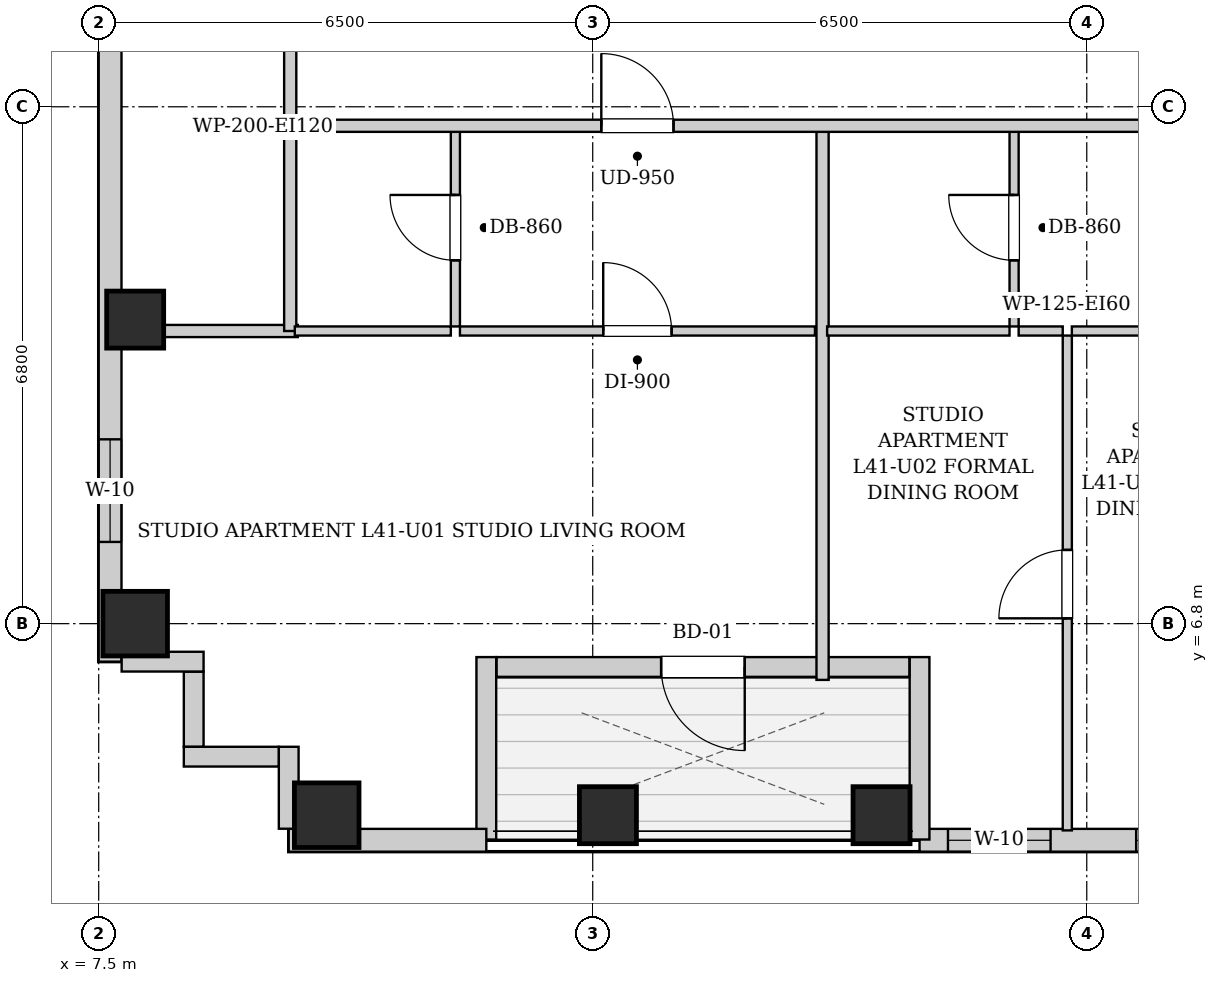
"""IFC4 building model, lengths in metres.
Left out: names, types, materials, properties, quantities, classifications, styles, units other than length and angle.
Written with IfcOpenShell. Run it as: python <this file> out.ifc"""

import sys

from ifc_helpers import new_model, si_unit, direction, frame, frame_2d, origin, origin_2d, place, context, subcontext, project, spatial, rectangle, extrude, element, fill, save


model = new_model("IFC4")
c1 = context("Model", 3, precision=1e-05, world=origin(), true_north=direction((0.0, 1.0)))
c2 = subcontext(c1, "Body", "Model", "MODEL_VIEW")
j1 = project(units=[si_unit("LENGTHUNIT", "METRE"), si_unit("PLANEANGLEUNIT", "RADIAN")], contexts=[c1])
p1 = place(None, origin())
s1 = spatial("IfcSite", under=j1, at=p1, CompositionType="ELEMENT")
p2 = place(p1, origin())
s2 = spatial("IfcBuilding", under=s1, at=p2, CompositionType="ELEMENT")
p3 = place(p2, frame((0.0, 0.0, 143.9)))
s3 = spatial("IfcBuildingStorey", under=s2, at=p3, CompositionType="ELEMENT", Elevation=143.9)
p4 = place(p3, frame((10.5, 4.28, 0.0), z_axis=(0.0, 0.0, 1.0), x_axis=(1.0, 0.0, 0.0)))
e1 = element("IfcColumn", 1, at=p4, inside=s3, PredefinedType="COLUMN", context=c2, shape_type="SweptSolid", body=[
    extrude(rectangle(XDim=0.85, YDim=0.85, at=origin_2d()), origin(), (0.0, 0.0, 1.0), 3.25),
])
for number, where, z_axis, x_axis in (
    (2, (14.2, 4.28, 0.0), (0.0, 0.0, 1.0), (1.0, 0.0, 0.0)),
    (3, (17.8, 4.28, 0.0), (0.0, 0.0, 1.0), (1.0, 0.0, 0.0)),
):
    element("IfcColumn", number, at=place(p3, frame(where, z_axis=z_axis, x_axis=x_axis)), inside=s3, PredefinedType="COLUMN", context=c2, shape_type="SweptSolid", body=[
        extrude(rectangle(XDim=0.75, YDim=0.75, at=origin_2d()), origin(), (0.0, 0.0, 1.0), 3.25),
    ])
p5 = place(p3, frame((7.98, 6.8, 0.0), z_axis=(0.0, 0.0, 1.0), x_axis=(1.0, 0.0, 0.0)))
e4 = element("IfcColumn", 4, at=p5, inside=s3, PredefinedType="COLUMN", context=c2, shape_type="SweptSolid", body=[
    extrude(rectangle(XDim=0.85, YDim=0.85, at=origin_2d()), origin(), (0.0, 0.0, 1.0), 3.25),
])
p6 = place(p3, frame((7.98, 10.8, 0.0), z_axis=(0.0, 0.0, 1.0), x_axis=(1.0, 0.0, 0.0)))
e5 = element("IfcColumn", 5, at=p6, inside=s3, PredefinedType="COLUMN", context=c2, shape_type="SweptSolid", body=[
    extrude(rectangle(XDim=0.75, YDim=0.75, at=origin_2d()), origin(), (0.0, 0.0, 1.0), 3.25),
])
p7 = place(p3, frame((31.5, 3.95, 0.0), z_axis=(0.0, 0.0, 1.0), x_axis=(-1.0, 0.0, 0.0)))
e6 = element("IfcWall", 6, at=p7, inside=s3, PredefinedType="SOLIDWALL", context=c2, shape_type="SweptSolid", body=[
    extrude(rectangle(XDim=13.2, YDim=0.3, at=frame_2d((6.6, 0.0))), origin(), (0.0, 0.0, 1.0), 2.99),
])
p8 = place(p7, frame((11.476, 0.0, 0.55)))
e7 = element("IfcOpeningElement", 7, at=p8, cuts=e6, PredefinedType="OPENING", context=c2, shape_type="SweptSolid", body=[
    extrude(rectangle(XDim=1.35, YDim=1.2, at=frame_2d((0.675, 0.6))), frame((0.0, 0.16, 0.0), z_axis=(0.0, -1.0, 0.0), x_axis=(1.0, 0.0, 0.0)), (0.0, 0.0, 1.0), 0.32),
])
p9 = place(p7, frame((9.0, 0.0, 0.55)))
e8 = element("IfcOpeningElement", 8, at=p9, cuts=e6, PredefinedType="OPENING", context=c2, shape_type="SweptSolid", body=[
    extrude(rectangle(XDim=1.35, YDim=1.2, at=frame_2d((0.675, 0.6))), frame((0.0, 0.16, 0.0), z_axis=(0.0, -1.0, 0.0), x_axis=(1.0, 0.0, 0.0)), (0.0, 0.0, 1.0), 0.32),
])
p10 = place(p7, frame((2.55, 0.0, 0.55)))
e9 = element("IfcOpeningElement", 9, at=p10, cuts=e6, PredefinedType="OPENING", context=c2, shape_type="SweptSolid", body=[
    extrude(rectangle(XDim=1.35, YDim=1.2, at=frame_2d((0.675, 0.6))), frame((0.0, 0.16, 0.0), z_axis=(0.0, -1.0, 0.0), x_axis=(1.0, 0.0, 0.0)), (0.0, 0.0, 1.0), 0.32),
])
p11 = place(p7, frame((0.475, 0.0, 0.55)))
e10 = element("IfcOpeningElement", 10, at=p11, cuts=e6, PredefinedType="OPENING", context=c2, shape_type="SweptSolid", body=[
    extrude(rectangle(XDim=0.85, YDim=1.2, at=frame_2d((0.425, 0.6))), frame((0.0, 0.16, 0.0), z_axis=(0.0, -1.0, 0.0), x_axis=(1.0, 0.0, 0.0)), (0.0, 0.0, 1.0), 0.32),
])
p12 = place(p3, frame((18.3, 3.96, 0.0), z_axis=(0.0, 0.0, 1.0), x_axis=(0.0, 1.0, 0.0)))
e11 = element("IfcWall", 11, at=p12, inside=s3, PredefinedType="SOLIDWALL", context=c2, shape_type="SweptSolid", body=[
    extrude(rectangle(XDim=2.4, YDim=0.26, at=frame_2d((1.2, 0.0))), origin(), (0.0, 0.0, 1.0), 2.99),
])
p13 = place(p3, frame((18.166, 6.23, 0.0), z_axis=(0.0, 0.0, 1.0), x_axis=(-1.0, 0.0, 0.0)))
e12 = element("IfcWall", 12, at=p13, inside=s3, PredefinedType="SOLIDWALL", context=c2, shape_type="SweptSolid", body=[
    extrude(rectangle(XDim=5.432, YDim=0.26, at=frame_2d((2.716, 0.0))), origin(), (0.0, 0.0, 1.0), 2.99),
])
p14 = place(p13, frame((2.166, 0.0, 0.0)))
e13 = element("IfcOpeningElement", 13, at=p14, cuts=e12, PredefinedType="OPENING", context=c2, shape_type="SweptSolid", body=[
    extrude(rectangle(XDim=1.1, YDim=2.0, at=frame_2d((0.55, 1.0))), frame((0.0, 0.14, 0.0), z_axis=(0.0, -1.0, 0.0), x_axis=(1.0, 0.0, 0.0)), (0.0, 0.0, 1.0), 0.28),
])
p15 = place(p3, frame((12.6, 6.36, 0.0), z_axis=(0.0, 0.0, 1.0), x_axis=(0.0, -1.0, 0.0)))
e14 = element("IfcWall", 14, at=p15, inside=s3, PredefinedType="SOLIDWALL", context=c2, shape_type="SweptSolid", body=[
    extrude(rectangle(XDim=2.4, YDim=0.26, at=frame_2d((1.2, 0.0))), origin(), (0.0, 0.0, 1.0), 2.99),
])
p16 = place(p3, frame((12.6, 3.95, 0.0), z_axis=(0.0, 0.0, 1.0), x_axis=(-1.0, 0.0, 0.0)))
e15 = element("IfcWall", 15, at=p16, inside=s3, PredefinedType="SOLIDWALL", context=c2, shape_type="SweptSolid", body=[
    extrude(rectangle(XDim=2.6, YDim=0.3, at=frame_2d((1.3, 0.0))), origin(), (0.0, 0.0, 1.0), 2.99),
])
p17 = place(p3, frame((7.65, 6.3, 0.0), z_axis=(0.0, 0.0, 1.0), x_axis=(0.0, 1.0, 0.0)))
e16 = element("IfcWall", 16, at=p17, inside=s3, PredefinedType="SOLIDWALL", context=c2, shape_type="SweptSolid", body=[
    extrude(rectangle(XDim=34.5, YDim=0.3, at=frame_2d((17.25, 0.0))), origin(), (0.0, 0.0, 1.0), 2.99),
])
p18 = place(p17, frame((1.575, 0.0, 0.55)))
e17 = element("IfcOpeningElement", 17, at=p18, cuts=e16, PredefinedType="OPENING", context=c2, shape_type="SweptSolid", body=[
    extrude(rectangle(XDim=1.35, YDim=1.2, at=frame_2d((0.675, 0.6))), frame((0.0, 0.16, 0.0), z_axis=(0.0, -1.0, 0.0), x_axis=(1.0, 0.0, 0.0)), (0.0, 0.0, 1.0), 0.32),
])
p19 = place(p17, frame((30.075, 0.0, 0.55)))
e18 = element("IfcOpeningElement", 18, at=p19, cuts=e16, PredefinedType="OPENING", context=c2, shape_type="SweptSolid", body=[
    extrude(rectangle(XDim=1.35, YDim=1.2, at=frame_2d((0.675, 0.6))), frame((0.0, 0.16, 0.0), z_axis=(0.0, -1.0, 0.0), x_axis=(1.0, 0.0, 0.0)), (0.0, 0.0, 1.0), 0.32),
])
p20 = place(p17, frame((28.235, 0.0, 0.55)))
e19 = element("IfcOpeningElement", 19, at=p20, cuts=e16, PredefinedType="OPENING", context=c2, shape_type="SweptSolid", body=[
    extrude(rectangle(XDim=1.35, YDim=1.2, at=frame_2d((0.675, 0.6))), frame((0.0, 0.16, 0.0), z_axis=(0.0, -1.0, 0.0), x_axis=(1.0, 0.0, 0.0)), (0.0, 0.0, 1.0), 0.32),
])
p21 = place(p17, frame((11.175, 0.0, 0.55)))
e20 = element("IfcOpeningElement", 20, at=p21, cuts=e16, PredefinedType="OPENING", context=c2, shape_type="SweptSolid", body=[
    extrude(rectangle(XDim=1.35, YDim=1.2, at=frame_2d((0.675, 0.6))), frame((0.0, 0.16, 0.0), z_axis=(0.0, -1.0, 0.0), x_axis=(1.0, 0.0, 0.0)), (0.0, 0.0, 1.0), 0.32),
])
p22 = place(p17, frame((9.235, 0.0, 0.55)))
e21 = element("IfcOpeningElement", 21, at=p22, cuts=e16, PredefinedType="OPENING", context=c2, shape_type="SweptSolid", body=[
    extrude(rectangle(XDim=1.35, YDim=1.2, at=frame_2d((0.675, 0.6))), frame((0.0, 0.16, 0.0), z_axis=(0.0, -1.0, 0.0), x_axis=(1.0, 0.0, 0.0)), (0.0, 0.0, 1.0), 0.32),
])
p23 = place(p17, frame((18.2, 0.0, 0.55)))
e22 = element("IfcOpeningElement", 22, at=p23, cuts=e16, PredefinedType="OPENING", context=c2, shape_type="SweptSolid", body=[
    extrude(rectangle(XDim=1.35, YDim=1.2, at=frame_2d((0.675, 0.6))), frame((0.0, 0.16, 0.0), z_axis=(0.0, -1.0, 0.0), x_axis=(1.0, 0.0, 0.0)), (0.0, 0.0, 1.0), 0.32),
])
p24 = place(p17, frame((19.81, 0.0, 0.55)))
e23 = element("IfcOpeningElement", 23, at=p24, cuts=e16, PredefinedType="OPENING", context=c2, shape_type="SweptSolid", body=[
    extrude(rectangle(XDim=1.35, YDim=1.2, at=frame_2d((0.675, 0.6))), frame((0.0, 0.16, 0.0), z_axis=(0.0, -1.0, 0.0), x_axis=(1.0, 0.0, 0.0)), (0.0, 0.0, 1.0), 0.32),
])
p25 = place(p3, frame((10.0, 4.102, 0.0), z_axis=(0.0, 0.0, 1.0), x_axis=(0.0, 1.0, 0.0)))
e24 = element("IfcWall", 24, at=p25, inside=s3, PredefinedType="SOLIDWALL", context=c2, shape_type="SweptSolid", body=[
    extrude(rectangle(XDim=1.078, YDim=0.26, at=frame_2d((0.539, 0.0))), origin(), (0.0, 0.0, 1.0), 2.99),
])
p26 = place(p3, frame((9.868, 5.05, 0.0), z_axis=(0.0, 0.0, 1.0), x_axis=(-1.0, 0.0, 0.0)))
e25 = element("IfcWall", 25, at=p26, inside=s3, PredefinedType="SOLIDWALL", context=c2, shape_type="SweptSolid", body=[
    extrude(rectangle(XDim=1.248, YDim=0.26, at=frame_2d((0.624, 0.0))), origin(), (0.0, 0.0, 1.0), 2.99),
])
p27 = place(p3, frame((8.75, 5.182, 0.0), z_axis=(0.0, 0.0, 1.0), x_axis=(0.0, 1.0, 0.0)))
e26 = element("IfcWall", 26, at=p27, inside=s3, PredefinedType="SOLIDWALL", context=c2, shape_type="SweptSolid", body=[
    extrude(rectangle(XDim=0.986, YDim=0.26, at=frame_2d((0.493, 0.0))), origin(), (0.0, 0.0, 1.0), 2.99),
])
p28 = place(p3, frame((8.88, 6.3, 0.0), z_axis=(0.0, 0.0, 1.0), x_axis=(-1.0, 0.0, 0.0)))
e27 = element("IfcWall", 27, at=p28, inside=s3, PredefinedType="SOLIDWALL", context=c2, shape_type="SweptSolid", body=[
    extrude(rectangle(XDim=1.078, YDim=0.26, at=frame_2d((0.539, 0.0))), origin(), (0.0, 0.0, 1.0), 2.99),
])
p29 = place(p3, frame((10.02, 13.35, 0.0), z_axis=(0.0, 0.0, 1.0), x_axis=(0.0, 1.0, 0.0)))
e28 = element("IfcWall", 28, at=p29, inside=s3, PredefinedType="PARTITIONING", context=c2, shape_type="SweptSolid", body=[
    extrude(rectangle(XDim=1.74, YDim=0.16, at=frame_2d((0.87, 0.0))), origin(), (0.0, 0.0, 1.0), 2.99),
])
p30 = place(p3, frame((7.78, 10.65, 0.0), z_axis=(0.0, 0.0, 1.0), x_axis=(1.0, 0.0, 0.0)))
e29 = element("IfcWall", 29, at=p30, inside=s3, PredefinedType="PARTITIONING", context=c2, shape_type="SweptSolid", body=[
    extrude(rectangle(XDim=2.34, YDim=0.16, at=frame_2d((1.17, 0.0))), origin(), (0.0, 0.0, 1.0), 2.99),
])
p31 = place(p3, frame((10.02, 10.65, 0.0), z_axis=(0.0, 0.0, 1.0), x_axis=(0.0, 1.0, 0.0)))
e30 = element("IfcWall", 30, at=p31, inside=s3, PredefinedType="PARTITIONING", context=c2, shape_type="SweptSolid", body=[
    extrude(rectangle(XDim=2.66, YDim=0.16, at=frame_2d((1.33, 0.0))), origin(), (0.0, 0.0, 1.0), 2.99),
])
p32 = place(p3, frame((12.193, 10.71, 0.0), z_axis=(0.0, 0.0, 1.0), x_axis=(0.0, 1.0, 0.0)))
e31 = element("IfcWall", 31, at=p32, inside=s3, PredefinedType="PARTITIONING", context=c2, shape_type="SweptSolid", body=[
    extrude(rectangle(XDim=2.6, YDim=0.12, at=frame_2d((1.3, 0.0))), origin(), (0.0, 0.0, 1.0), 2.99),
])
p33 = place(p32, frame((0.87, 0.0, 0.0)))
e32 = element("IfcOpeningElement", 32, at=p33, cuts=e31, PredefinedType="OPENING", context=c2, shape_type="SweptSolid", body=[
    extrude(rectangle(XDim=0.86, YDim=2.05, at=frame_2d((0.43, 1.025))), frame((0.0, 0.07, 0.0), z_axis=(0.0, -1.0, 0.0), x_axis=(1.0, 0.0, 0.0)), (0.0, 0.0, 1.0), 0.14),
])
p34 = place(p3, frame((10.08, 10.65, 0.0), z_axis=(0.0, 0.0, 1.0), x_axis=(1.0, 0.0, 0.0)))
e33 = element("IfcWall", 33, at=p34, inside=s3, PredefinedType="PARTITIONING", context=c2, shape_type="SweptSolid", body=[
    extrude(rectangle(XDim=2.053, YDim=0.12, at=frame_2d((1.026, 0.0))), origin(), (0.0, 0.0, 1.0), 2.99),
])
p35 = place(p3, frame((12.253, 10.65, 0.0), z_axis=(0.0, 0.0, 1.0), x_axis=(1.0, 0.0, 0.0)))
e34 = element("IfcWall", 34, at=p35, inside=s3, PredefinedType="PARTITIONING", context=c2, shape_type="SweptSolid", body=[
    extrude(rectangle(XDim=4.671, YDim=0.12, at=frame_2d((2.335, 0.0))), origin(), (0.0, 0.0, 1.0), 2.99),
])
p36 = place(p35, frame((1.885, 0.0, 0.0)))
e35 = element("IfcOpeningElement", 35, at=p36, cuts=e34, PredefinedType="OPENING", context=c2, shape_type="SweptSolid", body=[
    extrude(rectangle(XDim=0.9, YDim=2.05, at=frame_2d((0.45, 1.025))), frame((0.0, 0.07, 0.0), z_axis=(0.0, -1.0, 0.0), x_axis=(1.0, 0.0, 0.0)), (0.0, 0.0, 1.0), 0.14),
])
p37 = place(p3, frame((17.024, 6.06, 0.0), z_axis=(0.0, 0.0, 1.0), x_axis=(0.0, 1.0, 0.0)))
e36 = element("IfcWall", 36, at=p37, inside=s3, PredefinedType="PARTITIONING", context=c2, shape_type="SweptSolid", body=[
    extrude(rectangle(XDim=7.25, YDim=0.16, at=frame_2d((3.625, 0.0))), origin(), (0.0, 0.0, 1.0), 2.99),
])
p38 = place(p3, frame((19.544, 10.71, 0.0), z_axis=(0.0, 0.0, 1.0), x_axis=(0.0, 1.0, 0.0)))
e37 = element("IfcWall", 37, at=p38, inside=s3, PredefinedType="PARTITIONING", context=c2, shape_type="SweptSolid", body=[
    extrude(rectangle(XDim=2.6, YDim=0.12, at=frame_2d((1.3, 0.0))), origin(), (0.0, 0.0, 1.0), 2.99),
])
p39 = place(p38, frame((0.87, 0.0, 0.0)))
e38 = element("IfcOpeningElement", 38, at=p39, cuts=e37, PredefinedType="OPENING", context=c2, shape_type="SweptSolid", body=[
    extrude(rectangle(XDim=0.86, YDim=2.05, at=frame_2d((0.43, 1.025))), frame((0.0, 0.07, 0.0), z_axis=(0.0, -1.0, 0.0), x_axis=(1.0, 0.0, 0.0)), (0.0, 0.0, 1.0), 0.14),
])
p40 = place(p3, frame((17.084, 10.65, 0.0), z_axis=(0.0, 0.0, 1.0), x_axis=(1.0, 0.0, 0.0)))
e39 = element("IfcWall", 39, at=p40, inside=s3, PredefinedType="PARTITIONING", context=c2, shape_type="SweptSolid", body=[
    extrude(rectangle(XDim=2.4, YDim=0.12, at=frame_2d((1.2, 0.0))), origin(), (0.0, 0.0, 1.0), 2.99),
])
p41 = place(p3, frame((19.604, 10.65, 0.0), z_axis=(0.0, 0.0, 1.0), x_axis=(1.0, 0.0, 0.0)))
e40 = element("IfcWall", 40, at=p41, inside=s3, PredefinedType="PARTITIONING", context=c2, shape_type="SweptSolid", body=[
    extrude(rectangle(XDim=0.58, YDim=0.12, at=frame_2d((0.29, 0.0))), origin(), (0.0, 0.0, 1.0), 2.99),
])
p42 = place(p3, frame((20.304, 10.65, 0.0), z_axis=(0.0, 0.0, 1.0), x_axis=(1.0, 0.0, 0.0)))
e41 = element("IfcWall", 41, at=p42, inside=s3, PredefinedType="PARTITIONING", context=c2, shape_type="SweptSolid", body=[
    extrude(rectangle(XDim=3.1, YDim=0.12, at=frame_2d((1.55, 0.0))), origin(), (0.0, 0.0, 1.0), 2.99),
])
p43 = place(p42, frame((1.1, 0.0, 0.0)))
e42 = element("IfcOpeningElement", 42, at=p43, cuts=e41, PredefinedType="OPENING", context=c2, shape_type="SweptSolid", body=[
    extrude(rectangle(XDim=0.9, YDim=2.05, at=frame_2d((0.45, 1.025))), frame((0.0, 0.07, 0.0), z_axis=(0.0, -1.0, 0.0), x_axis=(1.0, 0.0, 0.0)), (0.0, 0.0, 1.0), 0.14),
])
p44 = place(p3, frame((20.244, 4.08, 0.0), z_axis=(0.0, 0.0, 1.0), x_axis=(0.0, 1.0, 0.0)))
e43 = element("IfcWall", 43, at=p44, inside=s3, PredefinedType="PARTITIONING", context=c2, shape_type="SweptSolid", body=[
    extrude(rectangle(XDim=6.51, YDim=0.12, at=frame_2d((3.255, 0.0))), origin(), (0.0, 0.0, 1.0), 2.99),
])
p45 = place(p44, frame((2.79, 0.0, 0.0)))
e44 = element("IfcOpeningElement", 44, at=p45, cuts=e43, PredefinedType="OPENING", context=c2, shape_type="SweptSolid", body=[
    extrude(rectangle(XDim=0.9, YDim=2.05, at=frame_2d((0.45, 1.025))), frame((0.0, 0.07, 0.0), z_axis=(0.0, -1.0, 0.0), x_axis=(1.0, 0.0, 0.0)), (0.0, 0.0, 1.0), 0.14),
])
p46 = place(p3, frame((10.05, 13.35, 0.0), z_axis=(0.0, 0.0, 1.0), x_axis=(1.0, 0.0, 0.0)))
e45 = element("IfcWall", 45, at=p46, inside=s3, PredefinedType="PARTITIONING", context=c2, shape_type="SweptSolid", body=[
    extrude(rectangle(XDim=27.7, YDim=0.16, at=frame_2d((13.85, 0.0))), origin(), (0.0, 0.0, 1.0), 2.99),
])
p47 = place(p46, frame((4.063, 0.0, 0.0)))
e46 = element("IfcOpeningElement", 46, at=p47, cuts=e45, PredefinedType="OPENING", context=c2, shape_type="SweptSolid", body=[
    extrude(rectangle(XDim=0.95, YDim=2.1, at=frame_2d((0.475, 1.05))), frame((0.0, 0.09, 0.0), z_axis=(0.0, -1.0, 0.0), x_axis=(1.0, 0.0, 0.0)), (0.0, 0.0, 1.0), 0.18),
])
p48 = place(p46, frame((11.735, 0.0, 0.0)))
e47 = element("IfcOpeningElement", 47, at=p48, cuts=e45, PredefinedType="OPENING", context=c2, shape_type="SweptSolid", body=[
    extrude(rectangle(XDim=0.95, YDim=2.1, at=frame_2d((0.475, 1.05))), frame((0.0, 0.09, 0.0), z_axis=(0.0, -1.0, 0.0), x_axis=(1.0, 0.0, 0.0)), (0.0, 0.0, 1.0), 0.18),
])
p49 = place(p33, origin())
e48 = element("IfcDoor", 48, at=p49, inside=s3, OperationType="SINGLE_SWING_RIGHT", PredefinedType="DOOR", context=c2, shape_type="SweptSolid", body=[
    extrude(rectangle(XDim=0.86, YDim=2.05, at=frame_2d((0.43, 1.025))), frame((0.0, 0.025, 0.0), z_axis=(0.0, -1.0, 0.0), x_axis=(1.0, 0.0, 0.0)), (0.0, 0.0, 1.0), 0.05),
])
fill(e32, e48)
p50 = place(p36, origin())
e49 = element("IfcDoor", 49, at=p50, inside=s3, OperationType="SINGLE_SWING_LEFT", PredefinedType="DOOR", context=c2, shape_type="SweptSolid", body=[
    extrude(rectangle(XDim=0.9, YDim=2.05, at=frame_2d((0.45, 1.025))), frame((0.0, 0.025, 0.0), z_axis=(0.0, -1.0, 0.0), x_axis=(1.0, 0.0, 0.0)), (0.0, 0.0, 1.0), 0.05),
])
fill(e35, e49)
p51 = place(p39, origin())
e50 = element("IfcDoor", 50, at=p51, inside=s3, OperationType="SINGLE_SWING_RIGHT", PredefinedType="DOOR", context=c2, shape_type="SweptSolid", body=[
    extrude(rectangle(XDim=0.86, YDim=2.05, at=frame_2d((0.43, 1.025))), frame((0.0, 0.025, 0.0), z_axis=(0.0, -1.0, 0.0), x_axis=(1.0, 0.0, 0.0)), (0.0, 0.0, 1.0), 0.05),
])
fill(e38, e50)
p52 = place(p45, origin())
e51 = element("IfcDoor", 51, at=p52, inside=s3, OperationType="SINGLE_SWING_LEFT", PredefinedType="DOOR", context=c2, shape_type="SweptSolid", body=[
    extrude(rectangle(XDim=0.9, YDim=2.05, at=frame_2d((0.45, 1.025))), frame((0.0, 0.025, 0.0), z_axis=(0.0, -1.0, 0.0), x_axis=(1.0, 0.0, 0.0)), (0.0, 0.0, 1.0), 0.05),
])
fill(e44, e51)
p53 = place(p47, origin())
e52 = element("IfcDoor", 52, at=p53, inside=s3, OperationType="SINGLE_SWING_LEFT", PredefinedType="DOOR", context=c2, shape_type="SweptSolid", body=[
    extrude(rectangle(XDim=0.95, YDim=2.1, at=frame_2d((0.475, 1.05))), frame((0.0, 0.025, 0.0), z_axis=(0.0, -1.0, 0.0), x_axis=(1.0, 0.0, 0.0)), (0.0, 0.0, 1.0), 0.05),
])
fill(e46, e52)
p54 = place(p14, origin())
e53 = element("IfcDoor", 53, at=p54, inside=s3, OperationType="SINGLE_SWING_LEFT", PredefinedType="DOOR", context=c2, shape_type="SweptSolid", body=[
    extrude(rectangle(XDim=1.1, YDim=2.0, at=frame_2d((0.55, 1.0))), frame((0.0, 0.025, 0.0), z_axis=(0.0, -1.0, 0.0), x_axis=(1.0, 0.0, 0.0)), (0.0, 0.0, 1.0), 0.05),
])
fill(e13, e53)
p55 = place(p18, origin())
e54 = element("IfcWindow", 54, at=p55, inside=s3, PartitioningType="SINGLE_PANEL", PredefinedType="WINDOW", context=c2, shape_type="SweptSolid", body=[
    extrude(rectangle(XDim=1.35, YDim=1.2, at=frame_2d((0.675, 0.6))), frame((0.0, 0.03, 0.0), z_axis=(0.0, -1.0, 0.0), x_axis=(1.0, 0.0, 0.0)), (0.0, 0.0, 1.0), 0.06),
])
fill(e17, e54)
p56 = place(p8, origin())
e55 = element("IfcWindow", 55, at=p56, inside=s3, PartitioningType="SINGLE_PANEL", PredefinedType="WINDOW", context=c2, shape_type="SweptSolid", body=[
    extrude(rectangle(XDim=1.35, YDim=1.2, at=frame_2d((0.675, 0.6))), frame((0.0, 0.03, 0.0), z_axis=(0.0, -1.0, 0.0), x_axis=(1.0, 0.0, 0.0)), (0.0, 0.0, 1.0), 0.06),
])
fill(e7, e55)
p57 = place(p9, origin())
e56 = element("IfcWindow", 56, at=p57, inside=s3, PartitioningType="SINGLE_PANEL", PredefinedType="WINDOW", context=c2, shape_type="SweptSolid", body=[
    extrude(rectangle(XDim=1.35, YDim=1.2, at=frame_2d((0.675, 0.6))), frame((0.0, 0.03, 0.0), z_axis=(0.0, -1.0, 0.0), x_axis=(1.0, 0.0, 0.0)), (0.0, 0.0, 1.0), 0.06),
])
fill(e8, e56)
save(model, sys.argv[1])
